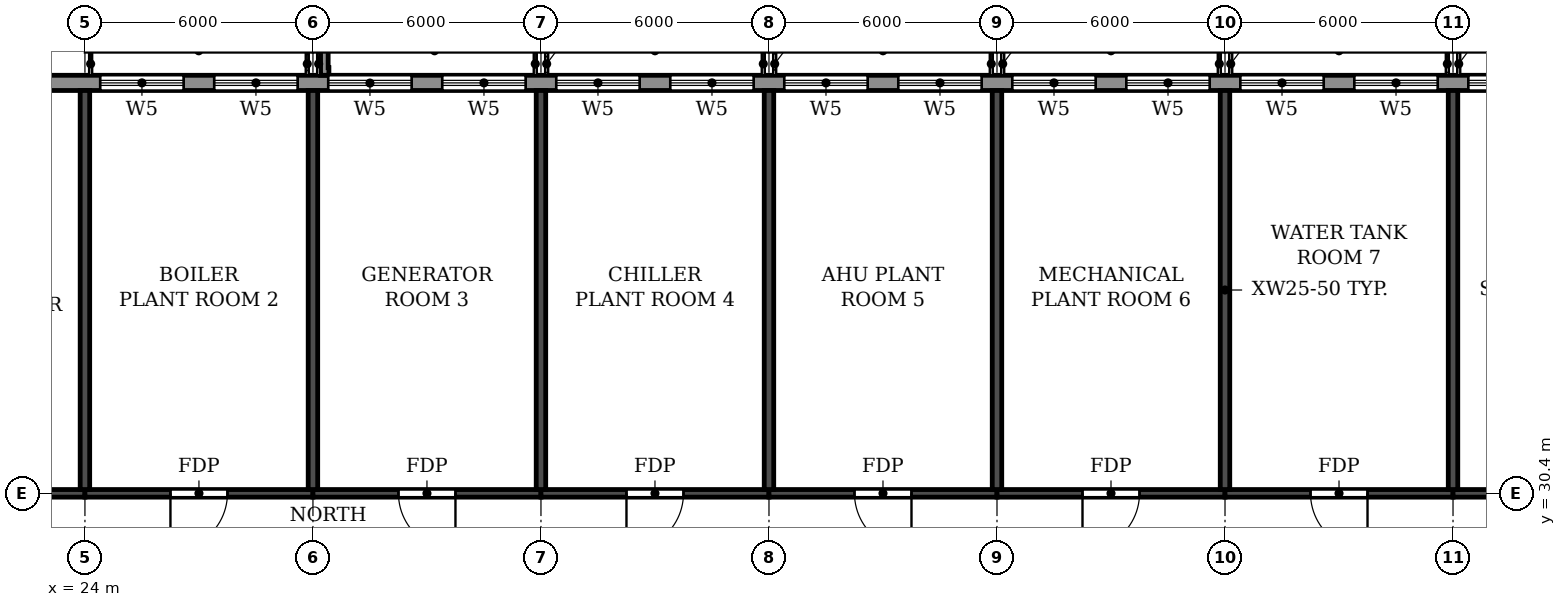
"""IFC4 building model, lengths in metres.
Left out: names, types, materials, properties, quantities, classifications, styles, units other than length and angle.
Written with IfcOpenShell. Run it as: python <this file> out.ifc"""

import sys

from ifc_helpers import new_model, si_unit, direction, frame, frame_2d, origin, place, context, subcontext, project, spatial, polyline, rectangle, outline, extrude, element, fill, save


model = new_model("IFC4")
c1 = context("Model", 3, precision=1e-05, world=origin(), true_north=direction((0.0, 1.0)))
c2 = subcontext(c1, "Body", "Model", "MODEL_VIEW")
j1 = project(units=[si_unit("LENGTHUNIT", "METRE"), si_unit("PLANEANGLEUNIT", "RADIAN")], contexts=[c1])
p1 = place(None, origin())
s1 = spatial("IfcSite", under=j1, at=p1, CompositionType="ELEMENT")
p2 = place(p1, origin())
s2 = spatial("IfcBuilding", under=s1, at=p2, CompositionType="ELEMENT")
p3 = place(p2, frame((0.0, 0.0, 267.0)))
s3 = spatial("IfcBuildingStorey", under=s2, at=p3, CompositionType="ELEMENT", Elevation=267.0)
for number, where, z_axis, x_axis in (
    (1, (24.0, 30.5, 0.0), (0.0, 0.0, 1.0), (0.0, 1.0, 0.0)),
    (2, (30.0, 30.5, 0.0), (0.0, 0.0, 1.0), (0.0, 1.0, 0.0)),
    (3, (36.0, 30.5, 0.0), (0.0, 0.0, 1.0), (0.0, 1.0, 0.0)),
    (4, (42.0, 30.5, 0.0), (0.0, 0.0, 1.0), (0.0, 1.0, 0.0)),
    (5, (48.0, 30.5, 0.0), (0.0, 0.0, 1.0), (0.0, 1.0, 0.0)),
    (6, (54.0, 30.5, 0.0), (0.0, 0.0, 1.0), (0.0, 1.0, 0.0)),
    (7, (60.0, 30.5, 0.0), (0.0, 0.0, 1.0), (0.0, 1.0, 0.0)),
):
    element("IfcWall", number, at=place(p3, frame(where, z_axis=z_axis, x_axis=x_axis)), inside=s3, PredefinedType="SHEAR", context=c2, shape_type="SweptSolid", body=[
        extrude(rectangle(XDim=10.5, YDim=0.25, at=frame_2d((5.25, 0.0))), origin(), (0.0, 0.0, 1.0), 5.15),
    ])
p4 = place(p3, frame((18.2, 30.4, 0.0), z_axis=(0.0, 0.0, 1.0), x_axis=(1.0, 0.0, 0.0)))
e8 = element("IfcWall", 8, at=p4, inside=s3, PredefinedType="SHEAR", context=c2, shape_type="SweptSolid", body=[
    extrude(rectangle(XDim=5.8, YDim=0.2, at=frame_2d((2.9, 0.0))), origin(), (0.0, 0.0, 1.0), 4.55),
])
p5 = place(p4, frame((2.05, 0.0, 0.0)))
e9 = element("IfcOpeningElement", 9, at=p5, cuts=e8, PredefinedType="OPENING", context=c2, shape_type="SweptSolid", body=[
    extrude(rectangle(XDim=1.5, YDim=2.1, at=frame_2d((0.75, 1.05))), frame((0.0, 0.11, 0.0), z_axis=(0.0, -1.0, 0.0), x_axis=(1.0, 0.0, 0.0)), (0.0, 0.0, 1.0), 0.22),
])
p6 = place(p3, frame((24.0, 30.4, 0.0), z_axis=(0.0, 0.0, 1.0), x_axis=(1.0, 0.0, 0.0)))
e10 = element("IfcWall", 10, at=p6, inside=s3, PredefinedType="SHEAR", context=c2, shape_type="SweptSolid", body=[
    extrude(rectangle(XDim=6.0, YDim=0.2, at=frame_2d((3.0, 0.0))), origin(), (0.0, 0.0, 1.0), 4.55),
])
p7 = place(p6, frame((2.25, 0.0, 0.0)))
e11 = element("IfcOpeningElement", 11, at=p7, cuts=e10, PredefinedType="OPENING", context=c2, shape_type="SweptSolid", body=[
    extrude(rectangle(XDim=1.5, YDim=2.1, at=frame_2d((0.75, 1.05))), frame((0.0, 0.11, 0.0), z_axis=(0.0, -1.0, 0.0), x_axis=(1.0, 0.0, 0.0)), (0.0, 0.0, 1.0), 0.22),
])
p8 = place(p3, frame((30.0, 30.4, 0.0), z_axis=(0.0, 0.0, 1.0), x_axis=(1.0, 0.0, 0.0)))
e12 = element("IfcWall", 12, at=p8, inside=s3, PredefinedType="SHEAR", context=c2, shape_type="SweptSolid", body=[
    extrude(rectangle(XDim=6.0, YDim=0.2, at=frame_2d((3.0, 0.0))), origin(), (0.0, 0.0, 1.0), 4.55),
])
p9 = place(p8, frame((2.25, 0.0, 0.0)))
e13 = element("IfcOpeningElement", 13, at=p9, cuts=e12, PredefinedType="OPENING", context=c2, shape_type="SweptSolid", body=[
    extrude(rectangle(XDim=1.5, YDim=2.1, at=frame_2d((0.75, 1.05))), frame((0.0, 0.11, 0.0), z_axis=(0.0, -1.0, 0.0), x_axis=(1.0, 0.0, 0.0)), (0.0, 0.0, 1.0), 0.22),
])
p10 = place(p3, frame((36.0, 30.4, 0.0), z_axis=(0.0, 0.0, 1.0), x_axis=(1.0, 0.0, 0.0)))
e14 = element("IfcWall", 14, at=p10, inside=s3, PredefinedType="SHEAR", context=c2, shape_type="SweptSolid", body=[
    extrude(rectangle(XDim=6.0, YDim=0.2, at=frame_2d((3.0, 0.0))), origin(), (0.0, 0.0, 1.0), 4.55),
])
p11 = place(p10, frame((2.25, 0.0, 0.0)))
e15 = element("IfcOpeningElement", 15, at=p11, cuts=e14, PredefinedType="OPENING", context=c2, shape_type="SweptSolid", body=[
    extrude(rectangle(XDim=1.5, YDim=2.1, at=frame_2d((0.75, 1.05))), frame((0.0, 0.11, 0.0), z_axis=(0.0, -1.0, 0.0), x_axis=(1.0, 0.0, 0.0)), (0.0, 0.0, 1.0), 0.22),
])
p12 = place(p3, frame((42.0, 30.4, 0.0), z_axis=(0.0, 0.0, 1.0), x_axis=(1.0, 0.0, 0.0)))
e16 = element("IfcWall", 16, at=p12, inside=s3, PredefinedType="SHEAR", context=c2, shape_type="SweptSolid", body=[
    extrude(rectangle(XDim=6.0, YDim=0.2, at=frame_2d((3.0, 0.0))), origin(), (0.0, 0.0, 1.0), 4.55),
])
p13 = place(p12, frame((2.25, 0.0, 0.0)))
e17 = element("IfcOpeningElement", 17, at=p13, cuts=e16, PredefinedType="OPENING", context=c2, shape_type="SweptSolid", body=[
    extrude(rectangle(XDim=1.5, YDim=2.1, at=frame_2d((0.75, 1.05))), frame((0.0, 0.11, 0.0), z_axis=(0.0, -1.0, 0.0), x_axis=(1.0, 0.0, 0.0)), (0.0, 0.0, 1.0), 0.22),
])
p14 = place(p3, frame((48.0, 30.4, 0.0), z_axis=(0.0, 0.0, 1.0), x_axis=(1.0, 0.0, 0.0)))
e18 = element("IfcWall", 18, at=p14, inside=s3, PredefinedType="SHEAR", context=c2, shape_type="SweptSolid", body=[
    extrude(rectangle(XDim=6.0, YDim=0.2, at=frame_2d((3.0, 0.0))), origin(), (0.0, 0.0, 1.0), 4.55),
])
p15 = place(p14, frame((2.25, 0.0, 0.0)))
e19 = element("IfcOpeningElement", 19, at=p15, cuts=e18, PredefinedType="OPENING", context=c2, shape_type="SweptSolid", body=[
    extrude(rectangle(XDim=1.5, YDim=2.1, at=frame_2d((0.75, 1.05))), frame((0.0, 0.11, 0.0), z_axis=(0.0, -1.0, 0.0), x_axis=(1.0, 0.0, 0.0)), (0.0, 0.0, 1.0), 0.22),
])
p16 = place(p3, frame((54.0, 30.4, 0.0), z_axis=(0.0, 0.0, 1.0), x_axis=(1.0, 0.0, 0.0)))
e20 = element("IfcWall", 20, at=p16, inside=s3, PredefinedType="SHEAR", context=c2, shape_type="SweptSolid", body=[
    extrude(rectangle(XDim=6.0, YDim=0.2, at=frame_2d((3.0, 0.0))), origin(), (0.0, 0.0, 1.0), 4.55),
])
p17 = place(p16, frame((2.25, 0.0, 0.0)))
e21 = element("IfcOpeningElement", 21, at=p17, cuts=e20, PredefinedType="OPENING", context=c2, shape_type="SweptSolid", body=[
    extrude(rectangle(XDim=1.5, YDim=2.1, at=frame_2d((0.75, 1.05))), frame((0.0, 0.11, 0.0), z_axis=(0.0, -1.0, 0.0), x_axis=(1.0, 0.0, 0.0)), (0.0, 0.0, 1.0), 0.22),
])
p18 = place(p3, frame((60.0, 30.4, 0.0), z_axis=(0.0, 0.0, 1.0), x_axis=(1.0, 0.0, 0.0)))
e22 = element("IfcWall", 22, at=p18, inside=s3, PredefinedType="SHEAR", context=c2, shape_type="SweptSolid", body=[
    extrude(rectangle(XDim=6.0, YDim=0.2, at=frame_2d((3.0, 0.0))), origin(), (0.0, 0.0, 1.0), 4.55),
])
p19 = place(p18, frame((2.25, 0.0, 0.0)))
e23 = element("IfcOpeningElement", 23, at=p19, cuts=e22, PredefinedType="OPENING", context=c2, shape_type="SweptSolid", body=[
    extrude(rectangle(XDim=1.5, YDim=2.1, at=frame_2d((0.75, 1.05))), frame((0.0, 0.11, 0.0), z_axis=(0.0, -1.0, 0.0), x_axis=(1.0, 0.0, 0.0)), (0.0, 0.0, 1.0), 0.22),
])
p20 = place(p3, frame((79.317, 41.2, 0.0), z_axis=(0.0, 0.0, 1.0), x_axis=(-1.0, 0.0, 0.0)))
e24 = element("IfcWall", 24, at=p20, inside=s3, PredefinedType="STANDARD", context=c2, shape_type="SweptSolid", body=[
    extrude(rectangle(XDim=56.634, YDim=0.4, at=frame_2d((28.317, 0.0))), origin(), (0.0, 0.0, 1.0), 5.15),
])
p21 = place(p20, frame((52.717, 0.0, 0.6)))
e25 = element("IfcOpeningElement", 25, at=p21, cuts=e24, PredefinedType="OPENING", context=c2, shape_type="SweptSolid", body=[
    extrude(rectangle(XDim=2.2, YDim=2.4, at=frame_2d((1.1, 1.2))), frame((0.0, 0.21, 0.0), z_axis=(0.0, -1.0, 0.0), x_axis=(1.0, 0.0, 0.0)), (0.0, 0.0, 1.0), 0.42),
])
p22 = place(p20, frame((49.717, 0.0, 0.6)))
e26 = element("IfcOpeningElement", 26, at=p22, cuts=e24, PredefinedType="OPENING", context=c2, shape_type="SweptSolid", body=[
    extrude(rectangle(XDim=2.2, YDim=2.4, at=frame_2d((1.1, 1.2))), frame((0.0, 0.21, 0.0), z_axis=(0.0, -1.0, 0.0), x_axis=(1.0, 0.0, 0.0)), (0.0, 0.0, 1.0), 0.42),
])
p23 = place(p20, frame((46.717, 0.0, 0.6)))
e27 = element("IfcOpeningElement", 27, at=p23, cuts=e24, PredefinedType="OPENING", context=c2, shape_type="SweptSolid", body=[
    extrude(rectangle(XDim=2.2, YDim=2.4, at=frame_2d((1.1, 1.2))), frame((0.0, 0.21, 0.0), z_axis=(0.0, -1.0, 0.0), x_axis=(1.0, 0.0, 0.0)), (0.0, 0.0, 1.0), 0.42),
])
p24 = place(p20, frame((43.717, 0.0, 0.6)))
e28 = element("IfcOpeningElement", 28, at=p24, cuts=e24, PredefinedType="OPENING", context=c2, shape_type="SweptSolid", body=[
    extrude(rectangle(XDim=2.2, YDim=2.4, at=frame_2d((1.1, 1.2))), frame((0.0, 0.21, 0.0), z_axis=(0.0, -1.0, 0.0), x_axis=(1.0, 0.0, 0.0)), (0.0, 0.0, 1.0), 0.42),
])
p25 = place(p20, frame((40.717, 0.0, 0.6)))
e29 = element("IfcOpeningElement", 29, at=p25, cuts=e24, PredefinedType="OPENING", context=c2, shape_type="SweptSolid", body=[
    extrude(rectangle(XDim=2.2, YDim=2.4, at=frame_2d((1.1, 1.2))), frame((0.0, 0.21, 0.0), z_axis=(0.0, -1.0, 0.0), x_axis=(1.0, 0.0, 0.0)), (0.0, 0.0, 1.0), 0.42),
])
p26 = place(p20, frame((37.717, 0.0, 0.6)))
e30 = element("IfcOpeningElement", 30, at=p26, cuts=e24, PredefinedType="OPENING", context=c2, shape_type="SweptSolid", body=[
    extrude(rectangle(XDim=2.2, YDim=2.4, at=frame_2d((1.1, 1.2))), frame((0.0, 0.21, 0.0), z_axis=(0.0, -1.0, 0.0), x_axis=(1.0, 0.0, 0.0)), (0.0, 0.0, 1.0), 0.42),
])
p27 = place(p20, frame((34.717, 0.0, 0.6)))
e31 = element("IfcOpeningElement", 31, at=p27, cuts=e24, PredefinedType="OPENING", context=c2, shape_type="SweptSolid", body=[
    extrude(rectangle(XDim=2.2, YDim=2.4, at=frame_2d((1.1, 1.2))), frame((0.0, 0.21, 0.0), z_axis=(0.0, -1.0, 0.0), x_axis=(1.0, 0.0, 0.0)), (0.0, 0.0, 1.0), 0.42),
])
p28 = place(p20, frame((31.717, 0.0, 0.6)))
e32 = element("IfcOpeningElement", 32, at=p28, cuts=e24, PredefinedType="OPENING", context=c2, shape_type="SweptSolid", body=[
    extrude(rectangle(XDim=2.2, YDim=2.4, at=frame_2d((1.1, 1.2))), frame((0.0, 0.21, 0.0), z_axis=(0.0, -1.0, 0.0), x_axis=(1.0, 0.0, 0.0)), (0.0, 0.0, 1.0), 0.42),
])
p29 = place(p20, frame((28.717, 0.0, 0.6)))
e33 = element("IfcOpeningElement", 33, at=p29, cuts=e24, PredefinedType="OPENING", context=c2, shape_type="SweptSolid", body=[
    extrude(rectangle(XDim=2.2, YDim=2.4, at=frame_2d((1.1, 1.2))), frame((0.0, 0.21, 0.0), z_axis=(0.0, -1.0, 0.0), x_axis=(1.0, 0.0, 0.0)), (0.0, 0.0, 1.0), 0.42),
])
p30 = place(p20, frame((25.717, 0.0, 0.6)))
e34 = element("IfcOpeningElement", 34, at=p30, cuts=e24, PredefinedType="OPENING", context=c2, shape_type="SweptSolid", body=[
    extrude(rectangle(XDim=2.2, YDim=2.4, at=frame_2d((1.1, 1.2))), frame((0.0, 0.21, 0.0), z_axis=(0.0, -1.0, 0.0), x_axis=(1.0, 0.0, 0.0)), (0.0, 0.0, 1.0), 0.42),
])
p31 = place(p20, frame((22.717, 0.0, 0.6)))
e35 = element("IfcOpeningElement", 35, at=p31, cuts=e24, PredefinedType="OPENING", context=c2, shape_type="SweptSolid", body=[
    extrude(rectangle(XDim=2.2, YDim=2.4, at=frame_2d((1.1, 1.2))), frame((0.0, 0.21, 0.0), z_axis=(0.0, -1.0, 0.0), x_axis=(1.0, 0.0, 0.0)), (0.0, 0.0, 1.0), 0.42),
])
p32 = place(p20, frame((19.717, 0.0, 0.6)))
e36 = element("IfcOpeningElement", 36, at=p32, cuts=e24, PredefinedType="OPENING", context=c2, shape_type="SweptSolid", body=[
    extrude(rectangle(XDim=2.2, YDim=2.4, at=frame_2d((1.1, 1.2))), frame((0.0, 0.21, 0.0), z_axis=(0.0, -1.0, 0.0), x_axis=(1.0, 0.0, 0.0)), (0.0, 0.0, 1.0), 0.42),
])
p33 = place(p20, frame((16.717, 0.0, 0.6)))
e37 = element("IfcOpeningElement", 37, at=p33, cuts=e24, PredefinedType="OPENING", context=c2, shape_type="SweptSolid", body=[
    extrude(rectangle(XDim=2.2, YDim=2.4, at=frame_2d((1.1, 1.2))), frame((0.0, 0.21, 0.0), z_axis=(0.0, -1.0, 0.0), x_axis=(1.0, 0.0, 0.0)), (0.0, 0.0, 1.0), 0.42),
])
p34 = place(p20, frame((13.717, 0.0, 0.6)))
e38 = element("IfcOpeningElement", 38, at=p34, cuts=e24, PredefinedType="OPENING", context=c2, shape_type="SweptSolid", body=[
    extrude(rectangle(XDim=2.2, YDim=2.4, at=frame_2d((1.1, 1.2))), frame((0.0, 0.21, 0.0), z_axis=(0.0, -1.0, 0.0), x_axis=(1.0, 0.0, 0.0)), (0.0, 0.0, 1.0), 0.42),
])
p35 = place(p20, frame((10.717, 0.0, 0.6)))
e39 = element("IfcOpeningElement", 39, at=p35, cuts=e24, PredefinedType="OPENING", context=c2, shape_type="SweptSolid", body=[
    extrude(rectangle(XDim=2.2, YDim=2.4, at=frame_2d((1.1, 1.2))), frame((0.0, 0.21, 0.0), z_axis=(0.0, -1.0, 0.0), x_axis=(1.0, 0.0, 0.0)), (0.0, 0.0, 1.0), 0.42),
])
p36 = place(p20, frame((7.717, 0.0, 0.6)))
e40 = element("IfcOpeningElement", 40, at=p36, cuts=e24, PredefinedType="OPENING", context=c2, shape_type="SweptSolid", body=[
    extrude(rectangle(XDim=2.2, YDim=2.4, at=frame_2d((1.1, 1.2))), frame((0.0, 0.21, 0.0), z_axis=(0.0, -1.0, 0.0), x_axis=(1.0, 0.0, 0.0)), (0.0, 0.0, 1.0), 0.42),
])
p37 = place(p20, frame((4.717, 0.0, 0.6)))
e41 = element("IfcOpeningElement", 41, at=p37, cuts=e24, PredefinedType="OPENING", context=c2, shape_type="SweptSolid", body=[
    extrude(rectangle(XDim=2.2, YDim=2.4, at=frame_2d((1.1, 1.2))), frame((0.0, 0.21, 0.0), z_axis=(0.0, -1.0, 0.0), x_axis=(1.0, 0.0, 0.0)), (0.0, 0.0, 1.0), 0.42),
])
p38 = place(p20, frame((1.717, 0.0, 0.6)))
e42 = element("IfcOpeningElement", 42, at=p38, cuts=e24, PredefinedType="OPENING", context=c2, shape_type="SweptSolid", body=[
    extrude(rectangle(XDim=2.2, YDim=2.4, at=frame_2d((1.1, 1.2))), frame((0.0, 0.21, 0.0), z_axis=(0.0, -1.0, 0.0), x_axis=(1.0, 0.0, 0.0)), (0.0, 0.0, 1.0), 0.42),
])
p39 = place(p3, origin())
e43 = element("IfcWall", 43, at=p39, inside=s3, PredefinedType="PARAPET", context=c2, shape_type="SweptSolid", body=[
    extrude(outline(polyline([(30.22, 41.4), (30.42, 41.4), (30.42, 41.6), (30.4, 41.6), (30.4, 51.4), (71.6, 51.4), (71.6, 41.6), (71.58, 41.6), (71.58, 41.4), (71.68, 41.4), (71.78, 41.4), (71.8, 41.4), (71.8, 51.6), (30.2, 51.6), (30.2, 41.4), (30.22, 41.4), (30.22, 41.4)])), origin(), (0.0, 0.0, 1.0), 1.1),
])
p40 = place(p21, origin())
e44 = element("IfcWindow", 44, at=p40, inside=s3, PartitioningType="TRIPLE_PANEL_HORIZONTAL", PredefinedType="WINDOW", context=c2, shape_type="SweptSolid", body=[
    extrude(rectangle(XDim=2.2, YDim=2.4, at=frame_2d((1.1, 1.2))), frame((0.0, 0.03, 0.0), z_axis=(0.0, -1.0, 0.0), x_axis=(1.0, 0.0, 0.0)), (0.0, 0.0, 1.0), 0.06),
])
fill(e25, e44)
p41 = place(p22, origin())
e45 = element("IfcWindow", 45, at=p41, inside=s3, PartitioningType="TRIPLE_PANEL_HORIZONTAL", PredefinedType="WINDOW", context=c2, shape_type="SweptSolid", body=[
    extrude(rectangle(XDim=2.2, YDim=2.4, at=frame_2d((1.1, 1.2))), frame((0.0, 0.03, 0.0), z_axis=(0.0, -1.0, 0.0), x_axis=(1.0, 0.0, 0.0)), (0.0, 0.0, 1.0), 0.06),
])
fill(e26, e45)
p42 = place(p23, origin())
e46 = element("IfcWindow", 46, at=p42, inside=s3, PartitioningType="TRIPLE_PANEL_HORIZONTAL", PredefinedType="WINDOW", context=c2, shape_type="SweptSolid", body=[
    extrude(rectangle(XDim=2.2, YDim=2.4, at=frame_2d((1.1, 1.2))), frame((0.0, 0.03, 0.0), z_axis=(0.0, -1.0, 0.0), x_axis=(1.0, 0.0, 0.0)), (0.0, 0.0, 1.0), 0.06),
])
fill(e27, e46)
p43 = place(p24, origin())
e47 = element("IfcWindow", 47, at=p43, inside=s3, PartitioningType="TRIPLE_PANEL_HORIZONTAL", PredefinedType="WINDOW", context=c2, shape_type="SweptSolid", body=[
    extrude(rectangle(XDim=2.2, YDim=2.4, at=frame_2d((1.1, 1.2))), frame((0.0, 0.03, 0.0), z_axis=(0.0, -1.0, 0.0), x_axis=(1.0, 0.0, 0.0)), (0.0, 0.0, 1.0), 0.06),
])
fill(e28, e47)
p44 = place(p25, origin())
e48 = element("IfcWindow", 48, at=p44, inside=s3, PartitioningType="TRIPLE_PANEL_HORIZONTAL", PredefinedType="WINDOW", context=c2, shape_type="SweptSolid", body=[
    extrude(rectangle(XDim=2.2, YDim=2.4, at=frame_2d((1.1, 1.2))), frame((0.0, 0.03, 0.0), z_axis=(0.0, -1.0, 0.0), x_axis=(1.0, 0.0, 0.0)), (0.0, 0.0, 1.0), 0.06),
])
fill(e29, e48)
p45 = place(p26, origin())
e49 = element("IfcWindow", 49, at=p45, inside=s3, PartitioningType="TRIPLE_PANEL_HORIZONTAL", PredefinedType="WINDOW", context=c2, shape_type="SweptSolid", body=[
    extrude(rectangle(XDim=2.2, YDim=2.4, at=frame_2d((1.1, 1.2))), frame((0.0, 0.03, 0.0), z_axis=(0.0, -1.0, 0.0), x_axis=(1.0, 0.0, 0.0)), (0.0, 0.0, 1.0), 0.06),
])
fill(e30, e49)
p46 = place(p27, origin())
e50 = element("IfcWindow", 50, at=p46, inside=s3, PartitioningType="TRIPLE_PANEL_HORIZONTAL", PredefinedType="WINDOW", context=c2, shape_type="SweptSolid", body=[
    extrude(rectangle(XDim=2.2, YDim=2.4, at=frame_2d((1.1, 1.2))), frame((0.0, 0.03, 0.0), z_axis=(0.0, -1.0, 0.0), x_axis=(1.0, 0.0, 0.0)), (0.0, 0.0, 1.0), 0.06),
])
fill(e31, e50)
p47 = place(p28, origin())
e51 = element("IfcWindow", 51, at=p47, inside=s3, PartitioningType="TRIPLE_PANEL_HORIZONTAL", PredefinedType="WINDOW", context=c2, shape_type="SweptSolid", body=[
    extrude(rectangle(XDim=2.2, YDim=2.4, at=frame_2d((1.1, 1.2))), frame((0.0, 0.03, 0.0), z_axis=(0.0, -1.0, 0.0), x_axis=(1.0, 0.0, 0.0)), (0.0, 0.0, 1.0), 0.06),
])
fill(e32, e51)
p48 = place(p29, origin())
e52 = element("IfcWindow", 52, at=p48, inside=s3, PartitioningType="TRIPLE_PANEL_HORIZONTAL", PredefinedType="WINDOW", context=c2, shape_type="SweptSolid", body=[
    extrude(rectangle(XDim=2.2, YDim=2.4, at=frame_2d((1.1, 1.2))), frame((0.0, 0.03, 0.0), z_axis=(0.0, -1.0, 0.0), x_axis=(1.0, 0.0, 0.0)), (0.0, 0.0, 1.0), 0.06),
])
fill(e33, e52)
p49 = place(p30, origin())
e53 = element("IfcWindow", 53, at=p49, inside=s3, PartitioningType="TRIPLE_PANEL_HORIZONTAL", PredefinedType="WINDOW", context=c2, shape_type="SweptSolid", body=[
    extrude(rectangle(XDim=2.2, YDim=2.4, at=frame_2d((1.1, 1.2))), frame((0.0, 0.03, 0.0), z_axis=(0.0, -1.0, 0.0), x_axis=(1.0, 0.0, 0.0)), (0.0, 0.0, 1.0), 0.06),
])
fill(e34, e53)
p50 = place(p31, origin())
e54 = element("IfcWindow", 54, at=p50, inside=s3, PartitioningType="TRIPLE_PANEL_HORIZONTAL", PredefinedType="WINDOW", context=c2, shape_type="SweptSolid", body=[
    extrude(rectangle(XDim=2.2, YDim=2.4, at=frame_2d((1.1, 1.2))), frame((0.0, 0.03, 0.0), z_axis=(0.0, -1.0, 0.0), x_axis=(1.0, 0.0, 0.0)), (0.0, 0.0, 1.0), 0.06),
])
fill(e35, e54)
p51 = place(p32, origin())
e55 = element("IfcWindow", 55, at=p51, inside=s3, PartitioningType="TRIPLE_PANEL_HORIZONTAL", PredefinedType="WINDOW", context=c2, shape_type="SweptSolid", body=[
    extrude(rectangle(XDim=2.2, YDim=2.4, at=frame_2d((1.1, 1.2))), frame((0.0, 0.03, 0.0), z_axis=(0.0, -1.0, 0.0), x_axis=(1.0, 0.0, 0.0)), (0.0, 0.0, 1.0), 0.06),
])
fill(e36, e55)
p52 = place(p33, origin())
e56 = element("IfcWindow", 56, at=p52, inside=s3, PartitioningType="TRIPLE_PANEL_HORIZONTAL", PredefinedType="WINDOW", context=c2, shape_type="SweptSolid", body=[
    extrude(rectangle(XDim=2.2, YDim=2.4, at=frame_2d((1.1, 1.2))), frame((0.0, 0.03, 0.0), z_axis=(0.0, -1.0, 0.0), x_axis=(1.0, 0.0, 0.0)), (0.0, 0.0, 1.0), 0.06),
])
fill(e37, e56)
p53 = place(p7, frame((1.5, 0.0, 0.0), z_axis=(0.0, 0.0, 1.0), x_axis=(-1.0, 0.0, 0.0)))
e57 = element("IfcDoor", 57, at=p53, inside=s3, OperationType="DOUBLE_DOOR_SINGLE_SWING", PredefinedType="DOOR", context=c2, shape_type="SweptSolid", body=[
    extrude(rectangle(XDim=1.5, YDim=2.1, at=frame_2d((0.75, 1.05))), frame((0.0, 0.025, 0.0), z_axis=(0.0, -1.0, 0.0), x_axis=(1.0, 0.0, 0.0)), (0.0, 0.0, 1.0), 0.05),
])
fill(e11, e57)
p54 = place(p9, frame((1.5, 0.0, 0.0), z_axis=(0.0, 0.0, 1.0), x_axis=(-1.0, 0.0, 0.0)))
e58 = element("IfcDoor", 58, at=p54, inside=s3, OperationType="DOUBLE_DOOR_SINGLE_SWING", PredefinedType="DOOR", context=c2, shape_type="SweptSolid", body=[
    extrude(rectangle(XDim=1.5, YDim=2.1, at=frame_2d((0.75, 1.05))), frame((0.0, 0.025, 0.0), z_axis=(0.0, -1.0, 0.0), x_axis=(1.0, 0.0, 0.0)), (0.0, 0.0, 1.0), 0.05),
])
fill(e13, e58)
p55 = place(p11, frame((1.5, 0.0, 0.0), z_axis=(0.0, 0.0, 1.0), x_axis=(-1.0, 0.0, 0.0)))
e59 = element("IfcDoor", 59, at=p55, inside=s3, OperationType="DOUBLE_DOOR_SINGLE_SWING", PredefinedType="DOOR", context=c2, shape_type="SweptSolid", body=[
    extrude(rectangle(XDim=1.5, YDim=2.1, at=frame_2d((0.75, 1.05))), frame((0.0, 0.025, 0.0), z_axis=(0.0, -1.0, 0.0), x_axis=(1.0, 0.0, 0.0)), (0.0, 0.0, 1.0), 0.05),
])
fill(e15, e59)
p56 = place(p13, frame((1.5, 0.0, 0.0), z_axis=(0.0, 0.0, 1.0), x_axis=(-1.0, 0.0, 0.0)))
e60 = element("IfcDoor", 60, at=p56, inside=s3, OperationType="DOUBLE_DOOR_SINGLE_SWING", PredefinedType="DOOR", context=c2, shape_type="SweptSolid", body=[
    extrude(rectangle(XDim=1.5, YDim=2.1, at=frame_2d((0.75, 1.05))), frame((0.0, 0.025, 0.0), z_axis=(0.0, -1.0, 0.0), x_axis=(1.0, 0.0, 0.0)), (0.0, 0.0, 1.0), 0.05),
])
fill(e17, e60)
p57 = place(p15, frame((1.5, 0.0, 0.0), z_axis=(0.0, 0.0, 1.0), x_axis=(-1.0, 0.0, 0.0)))
e61 = element("IfcDoor", 61, at=p57, inside=s3, OperationType="DOUBLE_DOOR_SINGLE_SWING", PredefinedType="DOOR", context=c2, shape_type="SweptSolid", body=[
    extrude(rectangle(XDim=1.5, YDim=2.1, at=frame_2d((0.75, 1.05))), frame((0.0, 0.025, 0.0), z_axis=(0.0, -1.0, 0.0), x_axis=(1.0, 0.0, 0.0)), (0.0, 0.0, 1.0), 0.05),
])
fill(e19, e61)
p58 = place(p17, frame((1.5, 0.0, 0.0), z_axis=(0.0, 0.0, 1.0), x_axis=(-1.0, 0.0, 0.0)))
e62 = element("IfcDoor", 62, at=p58, inside=s3, OperationType="DOUBLE_DOOR_SINGLE_SWING", PredefinedType="DOOR", context=c2, shape_type="SweptSolid", body=[
    extrude(rectangle(XDim=1.5, YDim=2.1, at=frame_2d((0.75, 1.05))), frame((0.0, 0.025, 0.0), z_axis=(0.0, -1.0, 0.0), x_axis=(1.0, 0.0, 0.0)), (0.0, 0.0, 1.0), 0.05),
])
fill(e21, e62)
save(model, sys.argv[1])
